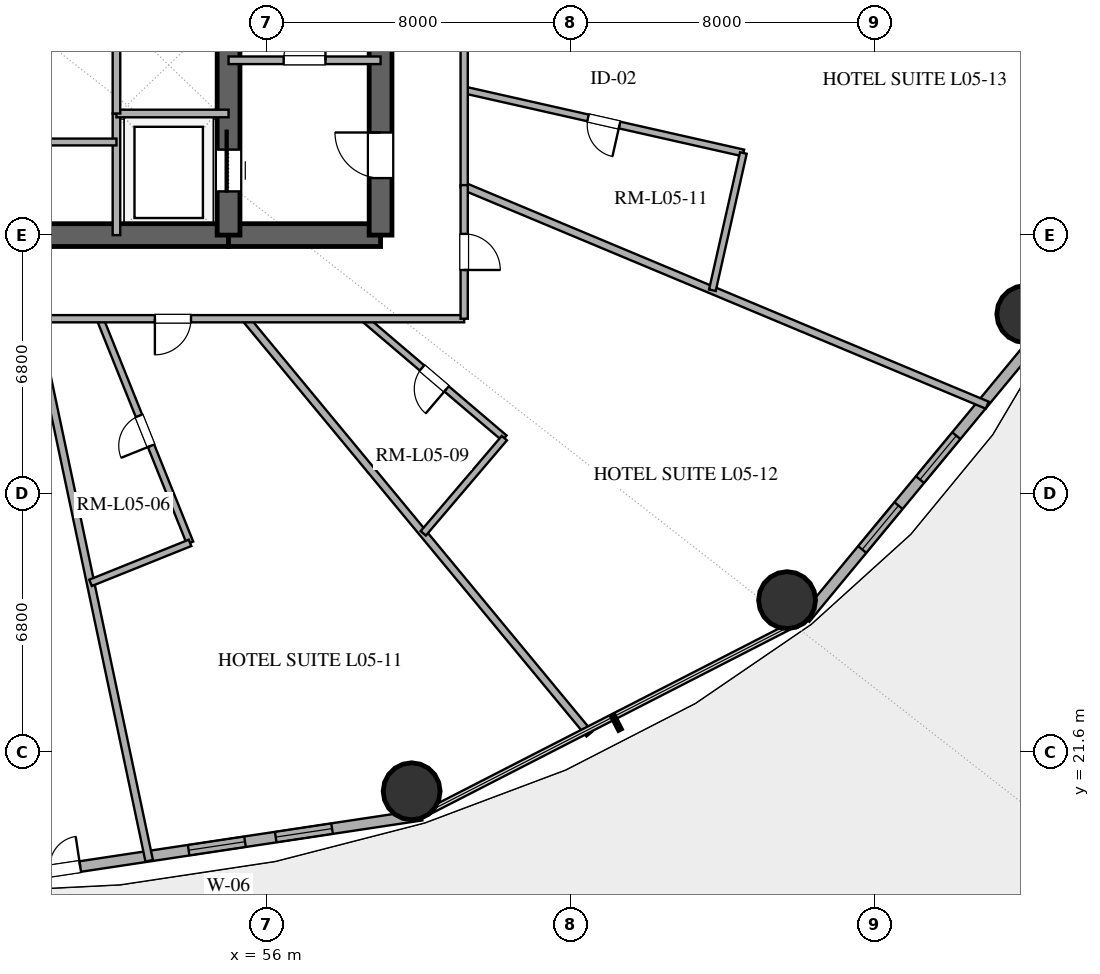
"""IFC4 building model, lengths in metres.
Left out: names, types, materials, properties, quantities, classifications, styles, units other than length and angle.
Written with IfcOpenShell. Run it as: python <this file> out.ifc"""

import sys

from ifc_helpers import new_model, si_unit, direction, frame, frame_2d, origin, origin_2d, place, context, subcontext, project, spatial, rectangle, hollow_circle, extrude, element, fill, save


model = new_model("IFC4")
c1 = context("Model", 3, precision=1e-05, world=origin(), true_north=direction((0.0, 1.0)))
c2 = subcontext(c1, "Body", "Model", "MODEL_VIEW")
j1 = project(units=[si_unit("LENGTHUNIT", "METRE"), si_unit("PLANEANGLEUNIT", "RADIAN")], contexts=[c1])
p1 = place(None, origin())
s1 = spatial("IfcSite", under=j1, at=p1, CompositionType="ELEMENT")
p2 = place(p1, origin())
s2 = spatial("IfcBuilding", under=s1, at=p2, CompositionType="ELEMENT")
p3 = place(p2, frame((0.0, 0.0, 28.2)))
s3 = spatial("IfcBuildingStorey", under=s2, at=p3, CompositionType="ELEMENT", Elevation=28.2)
p4 = place(p3, frame((41.0, 35.2, 0.0), z_axis=(0.0, 0.0, 1.0), x_axis=(1.0, 0.0, 0.0)))
e1 = element("IfcWall", 1, at=p4, inside=s3, PredefinedType="SHEAR", context=c2, shape_type="SweptSolid", body=[
    extrude(rectangle(XDim=14.0, YDim=0.6, at=frame_2d((7.0, 0.0))), origin(), (0.0, 0.0, 1.0), 3.38),
])
p5 = place(p4, frame((6.1, 0.0, 0.0)))
e2 = element("IfcOpeningElement", 2, at=p5, cuts=e1, PredefinedType="OPENING", context=c2, shape_type="SweptSolid", body=[
    extrude(rectangle(XDim=1.8, YDim=2.25, at=frame_2d((0.9, 1.125))), frame((0.0, 0.31, 0.0), z_axis=(0.0, -1.0, 0.0), x_axis=(1.0, 0.0, 0.0)), (0.0, 0.0, 1.0), 0.62),
])
p6 = place(p3, frame((55.0, 35.2, 0.0), z_axis=(0.0, 0.0, 1.0), x_axis=(1.0, 0.0, 0.0)))
e3 = element("IfcWall", 3, at=p6, inside=s3, PredefinedType="SHEAR", context=c2, shape_type="SweptSolid", body=[
    extrude(rectangle(XDim=4.0, YDim=0.6, at=frame_2d((2.0, 0.0))), origin(), (0.0, 0.0, 1.0), 3.38),
])
p7 = place(p3, frame((59.0, 35.2, 0.0), z_axis=(0.0, 0.0, 1.0), x_axis=(0.0, 1.0, 0.0)))
e4 = element("IfcWall", 4, at=p7, inside=s3, PredefinedType="SHEAR", context=c2, shape_type="SweptSolid", body=[
    extrude(rectangle(XDim=13.6, YDim=0.6, at=frame_2d((6.8, 0.0))), origin(), (0.0, 0.0, 1.0), 3.38),
])
p8 = place(p7, frame((1.5, 0.0, 0.0)))
e5 = element("IfcOpeningElement", 5, at=p8, cuts=e4, PredefinedType="OPENING", context=c2, shape_type="SweptSolid", body=[
    extrude(rectangle(XDim=1.2, YDim=2.15, at=frame_2d((0.6, 1.075))), frame((0.0, 0.31, 0.0), z_axis=(0.0, -1.0, 0.0), x_axis=(1.0, 0.0, 0.0)), (0.0, 0.0, 1.0), 0.62),
])
p9 = place(p3, frame((55.0, 35.2, 0.0), z_axis=(0.0, 0.0, 1.0), x_axis=(0.0, 1.0, 0.0)))
e6 = element("IfcWall", 6, at=p9, inside=s3, PredefinedType="SHEAR", context=c2, shape_type="SweptSolid", body=[
    extrude(rectangle(XDim=13.6, YDim=0.6, at=frame_2d((6.8, 0.0))), origin(), (0.0, 0.0, 1.0), 3.38),
])
p10 = place(p9, frame((1.15, 0.0, 0.0)))
e7 = element("IfcOpeningElement", 7, at=p10, cuts=e6, PredefinedType="OPENING", context=c2, shape_type="SweptSolid", body=[
    extrude(rectangle(XDim=1.1, YDim=2.2, at=frame_2d((0.55, 1.1))), frame((0.0, 0.31, 0.0), z_axis=(0.0, -1.0, 0.0), x_axis=(1.0, 0.0, 0.0)), (0.0, 0.0, 1.0), 0.62),
])
for number, where, z_axis, x_axis in (
    (8, (59.818, 20.566, 0.0), (0.0, 0.0, 1.0), (1.0, 0.0, 0.0)),
    (9, (69.697, 25.595, 0.0), (0.0, 0.0, 1.0), (1.0, 0.0, 0.0)),
    (10, (75.966, 33.122, 0.0), (0.0, 0.0, 1.0), (1.0, 0.0, 0.0)),
):
    element("IfcColumn", number, at=place(p3, frame(where, z_axis=z_axis, x_axis=x_axis)), inside=s3, PredefinedType="COLUMN", context=c2, shape_type="SweptSolid", body=[
        extrude(hollow_circle(Radius=0.75, WallThickness=0.04, at=origin_2d()), origin(), (0.0, 0.0, 1.0), 3.38),
    ])
p11 = place(p3, frame((48.0, 18.12, 0.0), z_axis=(0.0, 0.0, 1.0), x_axis=(0.988864835849, 0.148816452121, 0.0)))
e11 = element("IfcWall", 11, at=p11, inside=s3, PredefinedType="SOLIDWALL", context=c2, shape_type="SweptSolid", body=[
    extrude(rectangle(XDim=12.214, YDim=0.28, at=frame_2d((6.107, 0.0))), origin(), (0.0, 0.0, 1.0), 3.38),
])
p12 = place(p11, frame((1.531, 0.0, 0.0)))
e12 = element("IfcOpeningElement", 12, at=p12, cuts=e11, PredefinedType="OPENING", context=c2, shape_type="SweptSolid", body=[
    extrude(rectangle(XDim=1.6, YDim=2.25, at=frame_2d((0.8, 1.125))), frame((0.0, 0.15, 0.0), z_axis=(0.0, -1.0, 0.0), x_axis=(1.0, 0.0, 0.0)), (0.0, 0.0, 1.0), 0.3),
])
p13 = place(p11, frame((6.016, 0.0, 0.85)))
e13 = element("IfcOpeningElement", 13, at=p13, cuts=e11, PredefinedType="OPENING", context=c2, shape_type="SweptSolid", body=[
    extrude(rectangle(XDim=1.5, YDim=2.0, at=frame_2d((0.75, 1.0))), frame((0.0, 0.15, 0.0), z_axis=(0.0, -1.0, 0.0), x_axis=(1.0, 0.0, 0.0)), (0.0, 0.0, 1.0), 0.3),
])
p14 = place(p11, frame((8.333, 0.0, 0.85)))
e14 = element("IfcOpeningElement", 14, at=p14, cuts=e11, PredefinedType="OPENING", context=c2, shape_type="SweptSolid", body=[
    extrude(rectangle(XDim=1.5, YDim=2.0, at=frame_2d((0.75, 1.0))), frame((0.0, 0.15, 0.0), z_axis=(0.0, -1.0, 0.0), x_axis=(1.0, 0.0, 0.0)), (0.0, 0.0, 1.0), 0.3),
])
p15 = place(p3, frame((70.174, 25.114, 0.0), z_axis=(0.0, 0.0, 1.0), x_axis=(0.637296809613, 0.770618437657, 0.0)))
e15 = element("IfcWall", 15, at=p15, inside=s3, PredefinedType="SOLIDWALL", context=c2, shape_type="SweptSolid", body=[
    extrude(rectangle(XDim=10.053, YDim=0.28, at=frame_2d((5.027, 0.0))), origin(), (0.0, 0.0, 1.0), 3.38),
])
p16 = place(p15, frame((2.353, 0.0, 0.85)))
e16 = element("IfcOpeningElement", 16, at=p16, cuts=e15, PredefinedType="OPENING", context=c2, shape_type="SweptSolid", body=[
    extrude(rectangle(XDim=1.5, YDim=1.8, at=frame_2d((0.75, 0.9))), frame((0.0, 0.15, 0.0), z_axis=(0.0, -1.0, 0.0), x_axis=(1.0, 0.0, 0.0)), (0.0, 0.0, 1.0), 0.3),
])
p17 = place(p15, frame((4.74, 0.0, 0.85)))
e17 = element("IfcOpeningElement", 17, at=p17, cuts=e15, PredefinedType="OPENING", context=c2, shape_type="SweptSolid", body=[
    extrude(rectangle(XDim=1.5, YDim=1.8, at=frame_2d((0.75, 0.9))), frame((0.0, 0.15, 0.0), z_axis=(0.0, -1.0, 0.0), x_axis=(1.0, 0.0, 0.0)), (0.0, 0.0, 1.0), 0.3),
])
p18 = place(p3, frame((55.0, 39.8, 0.0), z_axis=(0.0, 0.0, 1.0), x_axis=(1.0, 0.0, 0.0)))
e18 = element("IfcWall", 18, at=p18, inside=s3, PredefinedType="SOLIDWALL", context=c2, shape_type="SweptSolid", body=[
    extrude(rectangle(XDim=4.0, YDim=0.2, at=frame_2d((2.0, 0.0))), origin(), (0.0, 0.0, 1.0), 2.74),
])
p19 = place(p18, frame((1.45, 0.0, 0.0)))
e19 = element("IfcOpeningElement", 19, at=p19, cuts=e18, PredefinedType="OPENING", context=c2, shape_type="SweptSolid", body=[
    extrude(rectangle(XDim=1.1, YDim=2.15, at=frame_2d((0.55, 1.075))), frame((0.0, 0.11, 0.0), z_axis=(0.0, -1.0, 0.0), x_axis=(1.0, 0.0, 0.0)), (0.0, 0.0, 1.0), 0.22),
])
p20 = place(p3, frame((52.05, 35.2, 0.0), z_axis=(0.0, 0.0, 1.0), x_axis=(0.0, 1.0, 0.0)))
e20 = element("IfcWall", 20, at=p20, inside=s3, PredefinedType="SOLIDWALL", context=c2, shape_type="SweptSolid", body=[
    extrude(rectangle(XDim=3.2, YDim=0.2, at=frame_2d((1.6, 0.0))), origin(), (0.0, 0.0, 1.0), 2.74),
])
p21 = place(p3, frame((52.05, 38.4, 0.0), z_axis=(0.0, 0.0, 1.0), x_axis=(1.0, 0.0, 0.0)))
e21 = element("IfcWall", 21, at=p21, inside=s3, PredefinedType="SOLIDWALL", context=c2, shape_type="SweptSolid", body=[
    extrude(rectangle(XDim=2.95, YDim=0.2, at=frame_2d((1.475, 0.0))), origin(), (0.0, 0.0, 1.0), 2.74),
])
p22 = place(p3, frame((52.05, 38.4, 0.0), z_axis=(0.0, 0.0, 1.0), x_axis=(0.0, 1.0, 0.0)))
e22 = element("IfcWall", 22, at=p22, inside=s3, PredefinedType="SOLIDWALL", context=c2, shape_type="SweptSolid", body=[
    extrude(rectangle(XDim=10.4, YDim=0.2, at=frame_2d((5.2, 0.0))), origin(), (0.0, 0.0, 1.0), 2.74),
])
p23 = place(p22, frame((8.2, 0.0, 0.0)))
e23 = element("IfcOpeningElement", 23, at=p23, cuts=e22, PredefinedType="OPENING", context=c2, shape_type="SweptSolid", body=[
    extrude(rectangle(XDim=1.2, YDim=2.2, at=frame_2d((0.6, 1.1))), frame((0.0, 0.11, 0.0), z_axis=(0.0, -1.0, 0.0), x_axis=(1.0, 0.0, 0.0)), (0.0, 0.0, 1.0), 0.22),
])
p24 = place(p3, frame((50.1, 37.65, 0.0), z_axis=(0.0, 0.0, 1.0), x_axis=(1.0, 0.0, 0.0)))
e24 = element("IfcWall", 24, at=p24, inside=s3, PredefinedType="PLUMBINGWALL", context=c2, shape_type="SweptSolid", body=[
    extrude(rectangle(XDim=1.95, YDim=0.18, at=frame_2d((0.975, 0.0))), origin(), (0.0, 0.0, 1.0), 2.74),
])
p25 = place(p3, frame((61.2, 36.48, 0.0), z_axis=(0.0, 0.0, 1.0), x_axis=(0.922585702004, -0.385792201136, 0.0)))
e25 = element("IfcWall", 25, at=p25, inside=s3, PredefinedType="PARTITIONING", context=c2, shape_type="SweptSolid", body=[
    extrude(rectangle(XDim=14.918, YDim=0.2, at=frame_2d((7.459, 0.0))), origin(), (0.0, 0.0, 1.0), 2.74),
])
p26 = place(p3, frame((68.547, 37.361, 0.0), z_axis=(0.0, 0.0, 1.0), x_axis=(-0.975442349969, 0.220254902072, 0.0)))
e26 = element("IfcWall", 26, at=p26, inside=s3, PredefinedType="PLUMBINGWALL", context=c2, shape_type="SweptSolid", body=[
    extrude(rectangle(XDim=7.532, YDim=0.18, at=frame_2d((3.766, 0.0))), origin(), (0.0, 0.0, 1.0), 2.74),
])
p27 = place(p26, frame((3.341, 0.0, 0.0)))
e27 = element("IfcOpeningElement", 27, at=p27, cuts=e26, PredefinedType="OPENING", context=c2, shape_type="SweptSolid", body=[
    extrude(rectangle(XDim=0.85, YDim=2.1, at=frame_2d((0.425, 1.05))), frame((0.0, 0.1, 0.0), z_axis=(0.0, -1.0, 0.0), x_axis=(1.0, 0.0, 0.0)), (0.0, 0.0, 1.0), 0.2),
])
p28 = place(p3, frame((49.9, 33.0, 0.0), z_axis=(0.0, 0.0, 1.0), x_axis=(0.206598790959, -0.97842574556, 0.0)))
e28 = element("IfcWall", 28, at=p28, inside=s3, PredefinedType="PARTITIONING", context=c2, shape_type="SweptSolid", body=[
    extrude(rectangle(XDim=14.576, YDim=0.2, at=frame_2d((7.288, 0.0))), origin(), (0.0, 0.0, 1.0), 2.74),
])
p29 = place(p3, frame((61.2, 51.0, 0.0), z_axis=(0.0, 0.0, 1.0), x_axis=(0.0, -1.0, 0.0)))
e29 = element("IfcWall", 29, at=p29, inside=s3, PredefinedType="PARTITIONING", context=c2, shape_type="SweptSolid", body=[
    extrude(rectangle(XDim=14.554, YDim=0.19, at=frame_2d((7.277, 0.0))), origin(), (0.0, 0.0, 1.0), 2.74),
])
p30 = place(p29, frame((3.684, 0.0, 0.0)))
e30 = element("IfcOpeningElement", 30, at=p30, cuts=e29, PredefinedType="OPENING", context=c2, shape_type="SweptSolid", body=[
    extrude(rectangle(XDim=1.0, YDim=2.2, at=frame_2d((0.5, 1.1))), frame((0.0, 0.105, 0.0), z_axis=(0.0, -1.0, 0.0), x_axis=(1.0, 0.0, 0.0)), (0.0, 0.0, 1.0), 0.21),
])
p31 = place(p29, frame((9.438, 0.0, 0.0)))
e31 = element("IfcOpeningElement", 31, at=p31, cuts=e29, PredefinedType="OPENING", context=c2, shape_type="SweptSolid", body=[
    extrude(rectangle(XDim=0.95, YDim=2.15, at=frame_2d((0.475, 1.075))), frame((0.0, 0.105, 0.0), z_axis=(0.0, -1.0, 0.0), x_axis=(1.0, 0.0, 0.0)), (0.0, 0.0, 1.0), 0.21),
])
p32 = place(p3, frame((55.449, 33.0, 0.0), z_axis=(0.0, 0.0, 1.0), x_axis=(0.637638501905, -0.770335732579, 0.0)))
e32 = element("IfcWall", 32, at=p32, inside=s3, PredefinedType="PARTITIONING", context=c2, shape_type="SweptSolid", body=[
    extrude(rectangle(XDim=14.187, YDim=0.2, at=frame_2d((7.094, 0.0))), origin(), (0.0, 0.0, 1.0), 2.74),
])
p33 = place(p3, frame((53.987, 27.102, 0.0), z_axis=(0.0, 0.0, 1.0), x_axis=(-0.37285379951, 0.927890103509, 0.0)))
e33 = element("IfcWall", 33, at=p33, inside=s3, PredefinedType="PLUMBINGWALL", context=c2, shape_type="SweptSolid", body=[
    extrude(rectangle(XDim=6.356, YDim=0.18, at=frame_2d((3.178, 0.0))), origin(), (0.0, 0.0, 1.0), 2.74),
])
p34 = place(p33, frame((2.753, 0.0, 0.0)))
e34 = element("IfcOpeningElement", 34, at=p34, cuts=e33, PredefinedType="OPENING", context=c2, shape_type="SweptSolid", body=[
    extrude(rectangle(XDim=0.85, YDim=2.1, at=frame_2d((0.425, 1.05))), frame((0.0, 0.1, 0.0), z_axis=(0.0, -1.0, 0.0), x_axis=(1.0, 0.0, 0.0)), (0.0, 0.0, 1.0), 0.2),
])
p35 = place(p3, frame((62.258, 29.859, 0.0), z_axis=(0.0, 0.0, 1.0), x_axis=(-0.761358380859, 0.648331254758, 0.0)))
e35 = element("IfcWall", 35, at=p35, inside=s3, PredefinedType="PLUMBINGWALL", context=c2, shape_type="SweptSolid", body=[
    extrude(rectangle(XDim=4.845, YDim=0.18, at=frame_2d((2.422, 0.0))), origin(), (0.0, 0.0, 1.0), 2.74),
])
p36 = place(p35, frame((1.997, 0.0, 0.0)))
e36 = element("IfcOpeningElement", 36, at=p36, cuts=e35, PredefinedType="OPENING", context=c2, shape_type="SweptSolid", body=[
    extrude(rectangle(XDim=0.85, YDim=2.1, at=frame_2d((0.425, 1.05))), frame((0.0, 0.1, 0.0), z_axis=(0.0, -1.0, 0.0), x_axis=(1.0, 0.0, 0.0)), (0.0, 0.0, 1.0), 0.2),
])
p37 = place(p3, frame((61.2, 33.0, 0.0), z_axis=(0.0, 0.0, 1.0), x_axis=(-1.0, 0.0, 0.0)))
e37 = element("IfcWall", 37, at=p37, inside=s3, PredefinedType="PARTITIONING", context=c2, shape_type="SweptSolid", body=[
    extrude(rectangle(XDim=11.3, YDim=0.19, at=frame_2d((5.65, 0.0))), origin(), (0.0, 0.0, 1.0), 2.74),
])
p38 = place(p37, frame((7.188, 0.0, 0.0)))
e38 = element("IfcOpeningElement", 38, at=p38, cuts=e37, PredefinedType="OPENING", context=c2, shape_type="SweptSolid", body=[
    extrude(rectangle(XDim=0.95, YDim=2.15, at=frame_2d((0.475, 1.075))), frame((0.0, 0.105, 0.0), z_axis=(0.0, -1.0, 0.0), x_axis=(1.0, 0.0, 0.0)), (0.0, 0.0, 1.0), 0.21),
])
p39 = place(p3, frame((67.731, 33.749, 0.0), z_axis=(0.0, 0.0, 1.0), x_axis=(0.220238608567, 0.9754460289, 0.0)))
e39 = element("IfcWall", 39, at=p39, inside=s3, PredefinedType="PLUMBINGWALL", context=c2, shape_type="SweptSolid", body=[
    extrude(rectangle(XDim=3.702, YDim=0.18, at=frame_2d((1.851, 0.0))), origin(), (0.0, 0.0, 1.0), 2.74),
])
p40 = place(p3, frame((61.2, 36.515, 0.0), z_axis=(0.0, 0.0, 1.0), x_axis=(0.0, -1.0, 0.0)))
e40 = element("IfcWall", 40, at=p40, inside=s3, PredefinedType="PARTITIONING", context=c2, shape_type="SweptSolid", body=[
    extrude(rectangle(XDim=3.515, YDim=0.19, at=frame_2d((1.758, 0.0))), origin(), (0.0, 0.0, 1.0), 2.74),
])
p41 = place(p40, frame((1.282, 0.0, 0.0)))
e41 = element("IfcOpeningElement", 41, at=p41, cuts=e40, PredefinedType="OPENING", context=c2, shape_type="SweptSolid", body=[
    extrude(rectangle(XDim=0.95, YDim=2.15, at=frame_2d((0.475, 1.075))), frame((0.0, 0.105, 0.0), z_axis=(0.0, -1.0, 0.0), x_axis=(1.0, 0.0, 0.0)), (0.0, 0.0, 1.0), 0.21),
])
p42 = place(p3, frame((60.124, 27.353, 0.0), z_axis=(0.0, 0.0, 1.0), x_axis=(0.648326357453, 0.76136255111, 0.0)))
e42 = element("IfcWall", 42, at=p42, inside=s3, PredefinedType="PLUMBINGWALL", context=c2, shape_type="SweptSolid", body=[
    extrude(rectangle(XDim=3.292, YDim=0.18, at=frame_2d((1.646, 0.0))), origin(), (0.0, 0.0, 1.0), 2.74),
])
p43 = place(p3, frame((51.368, 26.05, 0.0), z_axis=(0.0, 0.0, 1.0), x_axis=(0.927890861741, 0.372851912558, 0.0)))
e43 = element("IfcWall", 43, at=p43, inside=s3, PredefinedType="PLUMBINGWALL", context=c2, shape_type="SweptSolid", body=[
    extrude(rectangle(XDim=2.822, YDim=0.18, at=frame_2d((1.411, 0.0))), origin(), (0.0, 0.0, 1.0), 2.74),
])
p44 = place(p12, origin())
e44 = element("IfcDoor", 44, at=p44, inside=s3, OperationType="DOUBLE_DOOR_SINGLE_SWING", PredefinedType="DOOR", context=c2, shape_type="SweptSolid", body=[
    extrude(rectangle(XDim=1.6, YDim=2.25, at=frame_2d((0.8, 1.125))), frame((0.0, 0.025, 0.0), z_axis=(0.0, -1.0, 0.0), x_axis=(1.0, 0.0, 0.0)), (0.0, 0.0, 1.0), 0.05),
])
fill(e12, e44)
p45 = place(p13, origin())
e45 = element("IfcWindow", 45, at=p45, inside=s3, PartitioningType="SINGLE_PANEL", PredefinedType="WINDOW", context=c2, shape_type="SweptSolid", body=[
    extrude(rectangle(XDim=1.5, YDim=2.0, at=frame_2d((0.75, 1.0))), frame((0.0, 0.03, 0.0), z_axis=(0.0, -1.0, 0.0), x_axis=(1.0, 0.0, 0.0)), (0.0, 0.0, 1.0), 0.06),
])
fill(e13, e45)
p46 = place(p14, origin())
e46 = element("IfcWindow", 46, at=p46, inside=s3, PartitioningType="SINGLE_PANEL", PredefinedType="WINDOW", context=c2, shape_type="SweptSolid", body=[
    extrude(rectangle(XDim=1.5, YDim=2.0, at=frame_2d((0.75, 1.0))), frame((0.0, 0.03, 0.0), z_axis=(0.0, -1.0, 0.0), x_axis=(1.0, 0.0, 0.0)), (0.0, 0.0, 1.0), 0.06),
])
fill(e14, e46)
p47 = place(p16, origin())
e47 = element("IfcWindow", 47, at=p47, inside=s3, PartitioningType="SINGLE_PANEL", PredefinedType="WINDOW", context=c2, shape_type="SweptSolid", body=[
    extrude(rectangle(XDim=1.5, YDim=1.8, at=frame_2d((0.75, 0.9))), frame((0.0, 0.03, 0.0), z_axis=(0.0, -1.0, 0.0), x_axis=(1.0, 0.0, 0.0)), (0.0, 0.0, 1.0), 0.06),
])
fill(e16, e47)
p48 = place(p17, origin())
e48 = element("IfcWindow", 48, at=p48, inside=s3, PartitioningType="SINGLE_PANEL", PredefinedType="WINDOW", context=c2, shape_type="SweptSolid", body=[
    extrude(rectangle(XDim=1.5, YDim=1.8, at=frame_2d((0.75, 0.9))), frame((0.0, 0.03, 0.0), z_axis=(0.0, -1.0, 0.0), x_axis=(1.0, 0.0, 0.0)), (0.0, 0.0, 1.0), 0.06),
])
fill(e17, e48)
p49 = place(p10, origin())
e49 = element("IfcDoor", 49, at=p49, inside=s3, OperationType="SLIDING_TO_RIGHT", PredefinedType="DOOR", context=c2, shape_type="SweptSolid", body=[
    extrude(rectangle(XDim=1.1, YDim=2.2, at=frame_2d((0.55, 1.1))), frame((0.0, 0.025, 0.0), z_axis=(0.0, -1.0, 0.0), x_axis=(1.0, 0.0, 0.0)), (0.0, 0.0, 1.0), 0.05),
])
fill(e7, e49)
p50 = place(p8, origin())
e50 = element("IfcDoor", 50, at=p50, inside=s3, OperationType="SINGLE_SWING_RIGHT", PredefinedType="DOOR", context=c2, shape_type="SweptSolid", body=[
    extrude(rectangle(XDim=1.2, YDim=2.15, at=frame_2d((0.6, 1.075))), frame((0.0, 0.025, 0.0), z_axis=(0.0, -1.0, 0.0), x_axis=(1.0, 0.0, 0.0)), (0.0, 0.0, 1.0), 0.05),
])
fill(e5, e50)
p51 = place(p19, origin())
e51 = element("IfcDoor", 51, at=p51, inside=s3, OperationType="SINGLE_SWING_RIGHT", PredefinedType="DOOR", context=c2, shape_type="SweptSolid", body=[
    extrude(rectangle(XDim=1.1, YDim=2.15, at=frame_2d((0.55, 1.075))), frame((0.0, 0.025, 0.0), z_axis=(0.0, -1.0, 0.0), x_axis=(1.0, 0.0, 0.0)), (0.0, 0.0, 1.0), 0.05),
])
fill(e19, e51)
p52 = place(p27, origin())
e52 = element("IfcDoor", 52, at=p52, inside=s3, OperationType="SINGLE_SWING_LEFT", PredefinedType="DOOR", context=c2, shape_type="SweptSolid", body=[
    extrude(rectangle(XDim=0.85, YDim=2.1, at=frame_2d((0.425, 1.05))), frame((0.0, 0.025, 0.0), z_axis=(0.0, -1.0, 0.0), x_axis=(1.0, 0.0, 0.0)), (0.0, 0.0, 1.0), 0.05),
])
fill(e27, e52)
p53 = place(p34, origin())
e53 = element("IfcDoor", 53, at=p53, inside=s3, OperationType="SINGLE_SWING_LEFT", PredefinedType="DOOR", context=c2, shape_type="SweptSolid", body=[
    extrude(rectangle(XDim=0.85, YDim=2.1, at=frame_2d((0.425, 1.05))), frame((0.0, 0.025, 0.0), z_axis=(0.0, -1.0, 0.0), x_axis=(1.0, 0.0, 0.0)), (0.0, 0.0, 1.0), 0.05),
])
fill(e34, e53)
p54 = place(p36, origin())
e54 = element("IfcDoor", 54, at=p54, inside=s3, OperationType="SINGLE_SWING_LEFT", PredefinedType="DOOR", context=c2, shape_type="SweptSolid", body=[
    extrude(rectangle(XDim=0.85, YDim=2.1, at=frame_2d((0.425, 1.05))), frame((0.0, 0.025, 0.0), z_axis=(0.0, -1.0, 0.0), x_axis=(1.0, 0.0, 0.0)), (0.0, 0.0, 1.0), 0.05),
])
fill(e36, e54)
p55 = place(p38, origin())
e55 = element("IfcDoor", 55, at=p55, inside=s3, OperationType="SINGLE_SWING_RIGHT", PredefinedType="DOOR", context=c2, shape_type="SweptSolid", body=[
    extrude(rectangle(XDim=0.95, YDim=2.15, at=frame_2d((0.475, 1.075))), frame((0.0, 0.025, 0.0), z_axis=(0.0, -1.0, 0.0), x_axis=(1.0, 0.0, 0.0)), (0.0, 0.0, 1.0), 0.05),
])
fill(e38, e55)
p56 = place(p41, origin())
e56 = element("IfcDoor", 56, at=p56, inside=s3, OperationType="SINGLE_SWING_RIGHT", PredefinedType="DOOR", context=c2, shape_type="SweptSolid", body=[
    extrude(rectangle(XDim=0.95, YDim=2.15, at=frame_2d((0.475, 1.075))), frame((0.0, 0.025, 0.0), z_axis=(0.0, -1.0, 0.0), x_axis=(1.0, 0.0, 0.0)), (0.0, 0.0, 1.0), 0.05),
])
fill(e41, e56)
save(model, sys.argv[1])
